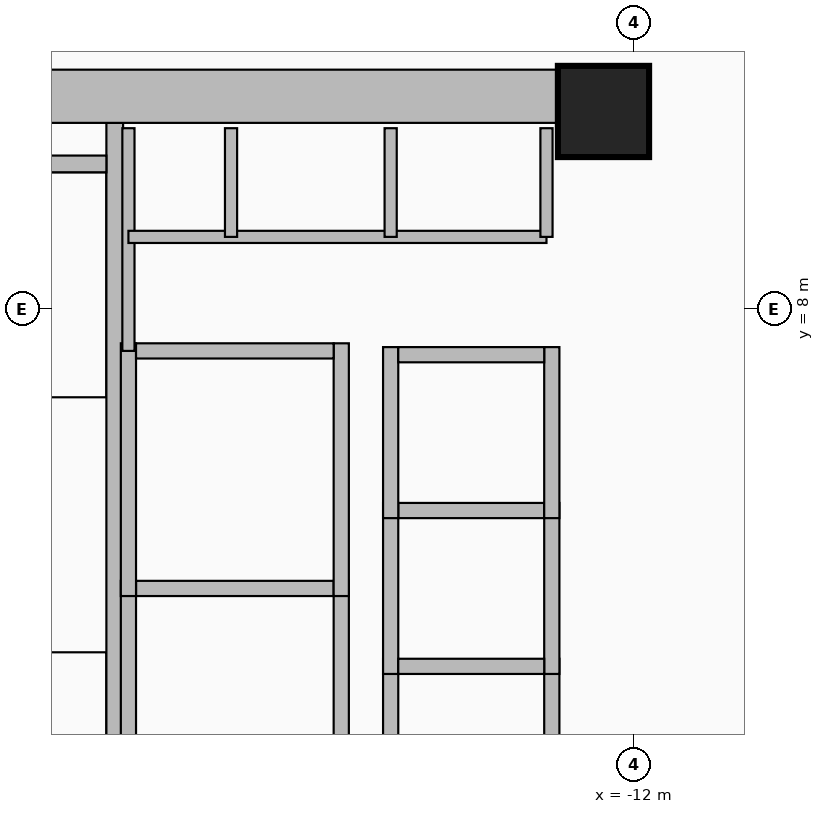
"""IFC4 building model, lengths in metres.
Left out: names, types, materials, properties, quantities, classifications, styles, units other than length and angle.
Written with IfcOpenShell. Run it as: python <this file> out.ifc"""

import sys

from ifc_helpers import new_model, si_unit, direction, frame, frame_2d, origin, origin_2d, place, context, subcontext, project, spatial, rectangle, extrude, source, transform, mapped, element, fill, save


model = new_model("IFC4")
c1 = context("Model", 3, precision=1e-05, world=origin(), true_north=direction((0.0, 1.0)))
c2 = subcontext(c1, "Body", "Model", "MODEL_VIEW")
j1 = project(units=[si_unit("LENGTHUNIT", "METRE"), si_unit("PLANEANGLEUNIT", "RADIAN")], contexts=[c1])
p1 = place(None, origin())
s1 = spatial("IfcSite", under=j1, at=p1, CompositionType="ELEMENT")
p2 = place(p1, origin())
s2 = spatial("IfcBuilding", under=s1, at=p2, CompositionType="ELEMENT")
p3 = place(p2, frame((0.0, 0.0, 101.1)))
s3 = spatial("IfcBuildingStorey", under=s2, at=p3, CompositionType="ELEMENT", Elevation=101.1)
p4 = place(p3, frame((-18.83, 1.78, 0.0), z_axis=(0.0, 0.0, 1.0), x_axis=(0.0, 1.0, 0.0)))
e1 = element("IfcWall", 1, at=p4, inside=s3, PredefinedType="SHEAR", context=c2, shape_type="SweptSolid", body=[
    extrude(rectangle(XDim=8.67, YDim=0.22, at=frame_2d((4.335, 0.0))), origin(), (0.0, 0.0, 1.0), 4.36),
])
p5 = place(p3, frame((-22.05, 9.91, 0.0), z_axis=(0.0, 0.0, 1.0), x_axis=(1.0, 0.0, 0.0)))
e2 = element("IfcWall", 2, at=p5, inside=s3, PredefinedType="SHEAR", context=c2, shape_type="SweptSolid", body=[
    extrude(rectangle(XDim=3.11, YDim=0.22, at=frame_2d((1.555, 0.0))), origin(), (0.0, 0.0, 1.0), 4.36),
])
p6 = place(p3, frame((-22.65, 10.8, 0.0), z_axis=(0.0, 0.0, 1.0), x_axis=(1.0, 0.0, 0.0)))
e3 = element("IfcWall", 3, at=p6, inside=s3, PredefinedType="SHEAR", context=c2, shape_type="SweptSolid", body=[
    extrude(rectangle(XDim=10.25, YDim=0.7, at=frame_2d((5.125, 0.0))), origin(), (0.0, 0.0, 1.0), 4.36),
])
m1 = source(origin(), c2, "Body", "SweptSolid", [
    extrude(rectangle(XDim=1.2, YDim=1.2, at=origin_2d()), origin(), (0.0, 0.0, 1.0), 4.6),
])
p7 = place(p3, frame((-12.4, 10.6, 0.0), z_axis=(0.0, 0.0, 1.0), x_axis=(1.0, 0.0, 0.0)))
e4 = element("IfcColumn", 4, at=p7, inside=s3, PredefinedType="COLUMN", context=c2, shape_type="MappedRepresentation", body=[
    mapped(m1, transform((0.0, 0.0, 0.0), x_axis=(1.0, 0.0, 0.0), y_axis=(0.0, 1.0, 0.0), z_axis=(0.0, 0.0, 1.0), scale=1.0)),
])
for number, where, z_axis, x_axis in (
    (5, (-18.65, 1.2, 0.0), (0.0, 0.0, 1.0), (0.0, 1.0, 0.0)),
    (6, (-15.85, 1.2, 0.0), (0.0, 0.0, 1.0), (0.0, 1.0, 0.0)),
):
    element("IfcWall", number, at=place(p3, frame(where, z_axis=z_axis, x_axis=x_axis)), inside=s3, PredefinedType="MOVABLE", context=c2, shape_type="SweptSolid", body=[
        extrude(rectangle(XDim=3.225, YDim=0.2, at=frame_2d((1.613, 0.0))), origin(), (0.0, 0.0, 1.0), 4.36),
    ])
p8 = place(p3, frame((-18.55, 4.325, 0.0), z_axis=(0.0, 0.0, 1.0), x_axis=(1.0, 0.0, 0.0)))
e7 = element("IfcWall", 7, at=p8, inside=s3, PredefinedType="MOVABLE", context=c2, shape_type="SweptSolid", body=[
    extrude(rectangle(XDim=2.6, YDim=0.2, at=frame_2d((1.3, 0.0))), origin(), (0.0, 0.0, 1.0), 4.36),
])
for number, where, z_axis, x_axis in (
    (8, (-18.65, 4.225, 0.0), (0.0, 0.0, 1.0), (0.0, 1.0, 0.0)),
    (9, (-15.85, 4.225, 0.0), (0.0, 0.0, 1.0), (0.0, 1.0, 0.0)),
):
    element("IfcWall", number, at=place(p3, frame(where, z_axis=z_axis, x_axis=x_axis)), inside=s3, PredefinedType="MOVABLE", context=c2, shape_type="SweptSolid", body=[
        extrude(rectangle(XDim=3.325, YDim=0.2, at=frame_2d((1.663, 0.0))), origin(), (0.0, 0.0, 1.0), 4.36),
    ])
p9 = place(p3, frame((-18.55, 7.45, 0.0), z_axis=(0.0, 0.0, 1.0), x_axis=(1.0, 0.0, 0.0)))
e10 = element("IfcWall", 10, at=p9, inside=s3, PredefinedType="MOVABLE", context=c2, shape_type="SweptSolid", body=[
    extrude(rectangle(XDim=2.6, YDim=0.2, at=frame_2d((1.3, 0.0))), origin(), (0.0, 0.0, 1.0), 4.36),
])
p10 = place(p9, frame((0.7, 0.0, 0.0)))
e11 = element("IfcOpeningElement", 11, at=p10, cuts=e10, PredefinedType="OPENING", context=c2, shape_type="SweptSolid", body=[
    extrude(rectangle(XDim=1.2, YDim=2.1, at=frame_2d((0.6, 1.05))), frame((0.0, 0.115, 0.0), z_axis=(0.0, -1.0, 0.0), x_axis=(1.0, 0.0, 0.0)), (0.0, 0.0, 1.0), 0.23),
])
p11 = place(p3, frame((-15.2, 1.15, 0.0), z_axis=(0.0, 0.0, 1.0), x_axis=(0.0, 1.0, 0.0)))
e12 = element("IfcWall", 12, at=p11, inside=s3, PredefinedType="MOVABLE", context=c2, shape_type="SweptSolid", body=[
    extrude(rectangle(XDim=2.25, YDim=0.2, at=frame_2d((1.125, 0.0))), origin(), (0.0, 0.0, 1.0), 4.36),
])
p12 = place(p3, frame((-13.08, 1.15, 0.0), z_axis=(0.0, 0.0, 1.0), x_axis=(0.0, 1.0, 0.0)))
e13 = element("IfcWall", 13, at=p12, inside=s3, PredefinedType="MOVABLE", context=c2, shape_type="SweptSolid", body=[
    extrude(rectangle(XDim=2.25, YDim=0.2, at=frame_2d((1.125, 0.0))), origin(), (0.0, 0.0, 1.0), 4.36),
])
p13 = place(p12, frame((0.575, 0.0, 0.0)))
e14 = element("IfcOpeningElement", 14, at=p13, cuts=e13, PredefinedType="OPENING", context=c2, shape_type="SweptSolid", body=[
    extrude(rectangle(XDim=1.1, YDim=2.1, at=frame_2d((0.55, 1.05))), frame((0.0, 0.115, 0.0), z_axis=(0.0, -1.0, 0.0), x_axis=(1.0, 0.0, 0.0)), (0.0, 0.0, 1.0), 0.23),
])
p14 = place(p3, frame((-15.2, 3.2, 0.0), z_axis=(0.0, 0.0, 1.0), x_axis=(0.0, 1.0, 0.0)))
e15 = element("IfcWall", 15, at=p14, inside=s3, PredefinedType="MOVABLE", context=c2, shape_type="SweptSolid", body=[
    extrude(rectangle(XDim=2.25, YDim=0.2, at=frame_2d((1.125, 0.0))), origin(), (0.0, 0.0, 1.0), 4.36),
])
p15 = place(p3, frame((-13.08, 3.2, 0.0), z_axis=(0.0, 0.0, 1.0), x_axis=(0.0, 1.0, 0.0)))
e16 = element("IfcWall", 16, at=p15, inside=s3, PredefinedType="MOVABLE", context=c2, shape_type="SweptSolid", body=[
    extrude(rectangle(XDim=2.25, YDim=0.2, at=frame_2d((1.125, 0.0))), origin(), (0.0, 0.0, 1.0), 4.36),
])
p16 = place(p15, frame((0.575, 0.0, 0.0)))
e17 = element("IfcOpeningElement", 17, at=p16, cuts=e16, PredefinedType="OPENING", context=c2, shape_type="SweptSolid", body=[
    extrude(rectangle(XDim=1.1, YDim=2.1, at=frame_2d((0.55, 1.05))), frame((0.0, 0.115, 0.0), z_axis=(0.0, -1.0, 0.0), x_axis=(1.0, 0.0, 0.0)), (0.0, 0.0, 1.0), 0.23),
])
for number, where, z_axis, x_axis in (
    (18, (-15.1, 3.3, 0.0), (0.0, 0.0, 1.0), (1.0, 0.0, 0.0)),
    (19, (-15.1, 5.35, 0.0), (0.0, 0.0, 1.0), (1.0, 0.0, 0.0)),
):
    element("IfcWall", number, at=place(p3, frame(where, z_axis=z_axis, x_axis=x_axis)), inside=s3, PredefinedType="MOVABLE", context=c2, shape_type="SweptSolid", body=[
        extrude(rectangle(XDim=1.92, YDim=0.2, at=frame_2d((0.96, 0.0))), origin(), (0.0, 0.0, 1.0), 4.36),
    ])
p17 = place(p3, frame((-15.2, 5.25, 0.0), z_axis=(0.0, 0.0, 1.0), x_axis=(0.0, 1.0, 0.0)))
e20 = element("IfcWall", 20, at=p17, inside=s3, PredefinedType="MOVABLE", context=c2, shape_type="SweptSolid", body=[
    extrude(rectangle(XDim=2.25, YDim=0.2, at=frame_2d((1.125, 0.0))), origin(), (0.0, 0.0, 1.0), 4.36),
])
p18 = place(p3, frame((-13.08, 5.25, 0.0), z_axis=(0.0, 0.0, 1.0), x_axis=(0.0, 1.0, 0.0)))
e21 = element("IfcWall", 21, at=p18, inside=s3, PredefinedType="MOVABLE", context=c2, shape_type="SweptSolid", body=[
    extrude(rectangle(XDim=2.25, YDim=0.2, at=frame_2d((1.125, 0.0))), origin(), (0.0, 0.0, 1.0), 4.36),
])
p19 = place(p18, frame((0.575, 0.0, 0.0)))
e22 = element("IfcOpeningElement", 22, at=p19, cuts=e21, PredefinedType="OPENING", context=c2, shape_type="SweptSolid", body=[
    extrude(rectangle(XDim=1.1, YDim=2.1, at=frame_2d((0.55, 1.05))), frame((0.0, 0.115, 0.0), z_axis=(0.0, -1.0, 0.0), x_axis=(1.0, 0.0, 0.0)), (0.0, 0.0, 1.0), 0.23),
])
p20 = place(p3, frame((-15.1, 7.4, 0.0), z_axis=(0.0, 0.0, 1.0), x_axis=(1.0, 0.0, 0.0)))
e23 = element("IfcWall", 23, at=p20, inside=s3, PredefinedType="MOVABLE", context=c2, shape_type="SweptSolid", body=[
    extrude(rectangle(XDim=1.92, YDim=0.2, at=frame_2d((0.96, 0.0))), origin(), (0.0, 0.0, 1.0), 4.36),
])
p21 = place(p3, frame((-18.65, 7.45, 0.0), z_axis=(0.0, 0.0, 1.0), x_axis=(0.0, 1.0, 0.0)))
e24 = element("IfcWall", 24, at=p21, inside=s3, PredefinedType="PARTITIONING", context=c2, shape_type="SweptSolid", body=[
    extrude(rectangle(XDim=2.93, YDim=0.16, at=frame_2d((1.465, 0.0))), origin(), (0.0, 0.0, 1.0), 4.36),
])
p22 = place(p3, frame((-18.65, 8.95, 0.0), z_axis=(0.0, 0.0, 1.0), x_axis=(1.0, 0.0, 0.0)))
e25 = element("IfcWall", 25, at=p22, inside=s3, PredefinedType="PARTITIONING", context=c2, shape_type="SweptSolid", body=[
    extrude(rectangle(XDim=5.5, YDim=0.16, at=frame_2d((2.75, 0.0))), origin(), (0.0, 0.0, 1.0), 4.36),
])
p23 = place(p22, frame((0.3, 0.0, 0.0)))
e26 = element("IfcOpeningElement", 26, at=p23, cuts=e25, PredefinedType="OPENING", context=c2, shape_type="SweptSolid", body=[
    extrude(rectangle(XDim=0.85, YDim=2.05, at=frame_2d((0.425, 1.025))), frame((0.0, 0.095, 0.0), z_axis=(0.0, -1.0, 0.0), x_axis=(1.0, 0.0, 0.0)), (0.0, 0.0, 1.0), 0.19),
])
p24 = place(p22, frame((1.85, 0.0, 0.0)))
e27 = element("IfcOpeningElement", 27, at=p24, cuts=e25, PredefinedType="OPENING", context=c2, shape_type="SweptSolid", body=[
    extrude(rectangle(XDim=0.85, YDim=2.05, at=frame_2d((0.425, 1.025))), frame((0.0, 0.095, 0.0), z_axis=(0.0, -1.0, 0.0), x_axis=(1.0, 0.0, 0.0)), (0.0, 0.0, 1.0), 0.19),
])
p25 = place(p22, frame((3.9, 0.0, 0.0)))
e28 = element("IfcOpeningElement", 28, at=p25, cuts=e25, PredefinedType="OPENING", context=c2, shape_type="SweptSolid", body=[
    extrude(rectangle(XDim=0.85, YDim=2.05, at=frame_2d((0.425, 1.025))), frame((0.0, 0.095, 0.0), z_axis=(0.0, -1.0, 0.0), x_axis=(1.0, 0.0, 0.0)), (0.0, 0.0, 1.0), 0.19),
])
for number, where, z_axis, x_axis in (
    (29, (-13.15, 8.95, 0.0), (0.0, 0.0, 1.0), (0.0, 1.0, 0.0)),
    (30, (-17.3, 8.95, 0.0), (0.0, 0.0, 1.0), (0.0, 1.0, 0.0)),
    (31, (-15.2, 8.95, 0.0), (0.0, 0.0, 1.0), (0.0, 1.0, 0.0)),
):
    element("IfcWall", number, at=place(p3, frame(where, z_axis=z_axis, x_axis=x_axis)), inside=s3, PredefinedType="PARTITIONING", context=c2, shape_type="SweptSolid", body=[
        extrude(rectangle(XDim=1.43, YDim=0.16, at=frame_2d((0.715, 0.0))), origin(), (0.0, 0.0, 1.0), 4.36),
    ])
p26 = place(p10, origin())
e32 = element("IfcDoor", 32, at=p26, inside=s3, OperationType="DOUBLE_DOOR_SLIDING", PredefinedType="DOOR", context=c2, shape_type="SweptSolid", body=[
    extrude(rectangle(XDim=1.2, YDim=2.1, at=frame_2d((0.6, 1.05))), frame((0.0, 0.025, 0.0), z_axis=(0.0, -1.0, 0.0), x_axis=(1.0, 0.0, 0.0)), (0.0, 0.0, 1.0), 0.05),
])
fill(e11, e32)
p27 = place(p13, origin())
e33 = element("IfcDoor", 33, at=p27, inside=s3, OperationType="DOUBLE_DOOR_SLIDING", PredefinedType="DOOR", context=c2, shape_type="SweptSolid", body=[
    extrude(rectangle(XDim=1.1, YDim=2.1, at=frame_2d((0.55, 1.05))), frame((0.0, 0.025, 0.0), z_axis=(0.0, -1.0, 0.0), x_axis=(1.0, 0.0, 0.0)), (0.0, 0.0, 1.0), 0.05),
])
fill(e14, e33)
p28 = place(p16, origin())
e34 = element("IfcDoor", 34, at=p28, inside=s3, OperationType="DOUBLE_DOOR_SLIDING", PredefinedType="DOOR", context=c2, shape_type="SweptSolid", body=[
    extrude(rectangle(XDim=1.1, YDim=2.1, at=frame_2d((0.55, 1.05))), frame((0.0, 0.025, 0.0), z_axis=(0.0, -1.0, 0.0), x_axis=(1.0, 0.0, 0.0)), (0.0, 0.0, 1.0), 0.05),
])
fill(e17, e34)
p29 = place(p19, origin())
e35 = element("IfcDoor", 35, at=p29, inside=s3, OperationType="DOUBLE_DOOR_SLIDING", PredefinedType="DOOR", context=c2, shape_type="SweptSolid", body=[
    extrude(rectangle(XDim=1.1, YDim=2.1, at=frame_2d((0.55, 1.05))), frame((0.0, 0.025, 0.0), z_axis=(0.0, -1.0, 0.0), x_axis=(1.0, 0.0, 0.0)), (0.0, 0.0, 1.0), 0.05),
])
fill(e22, e35)
p30 = place(p23, origin())
e36 = element("IfcDoor", 36, at=p30, inside=s3, OperationType="SINGLE_SWING_LEFT", PredefinedType="DOOR", context=c2, shape_type="SweptSolid", body=[
    extrude(rectangle(XDim=0.85, YDim=2.05, at=frame_2d((0.425, 1.025))), frame((0.0, 0.025, 0.0), z_axis=(0.0, -1.0, 0.0), x_axis=(1.0, 0.0, 0.0)), (0.0, 0.0, 1.0), 0.05),
])
fill(e26, e36)
p31 = place(p24, origin())
e37 = element("IfcDoor", 37, at=p31, inside=s3, OperationType="SINGLE_SWING_RIGHT", PredefinedType="DOOR", context=c2, shape_type="SweptSolid", body=[
    extrude(rectangle(XDim=0.85, YDim=2.05, at=frame_2d((0.425, 1.025))), frame((0.0, 0.025, 0.0), z_axis=(0.0, -1.0, 0.0), x_axis=(1.0, 0.0, 0.0)), (0.0, 0.0, 1.0), 0.05),
])
fill(e27, e37)
p32 = place(p25, origin())
e38 = element("IfcDoor", 38, at=p32, inside=s3, OperationType="SINGLE_SWING_LEFT", PredefinedType="DOOR", context=c2, shape_type="SweptSolid", body=[
    extrude(rectangle(XDim=0.85, YDim=2.05, at=frame_2d((0.425, 1.025))), frame((0.0, 0.025, 0.0), z_axis=(0.0, -1.0, 0.0), x_axis=(1.0, 0.0, 0.0)), (0.0, 0.0, 1.0), 0.05),
])
fill(e28, e38)
save(model, sys.argv[1])
